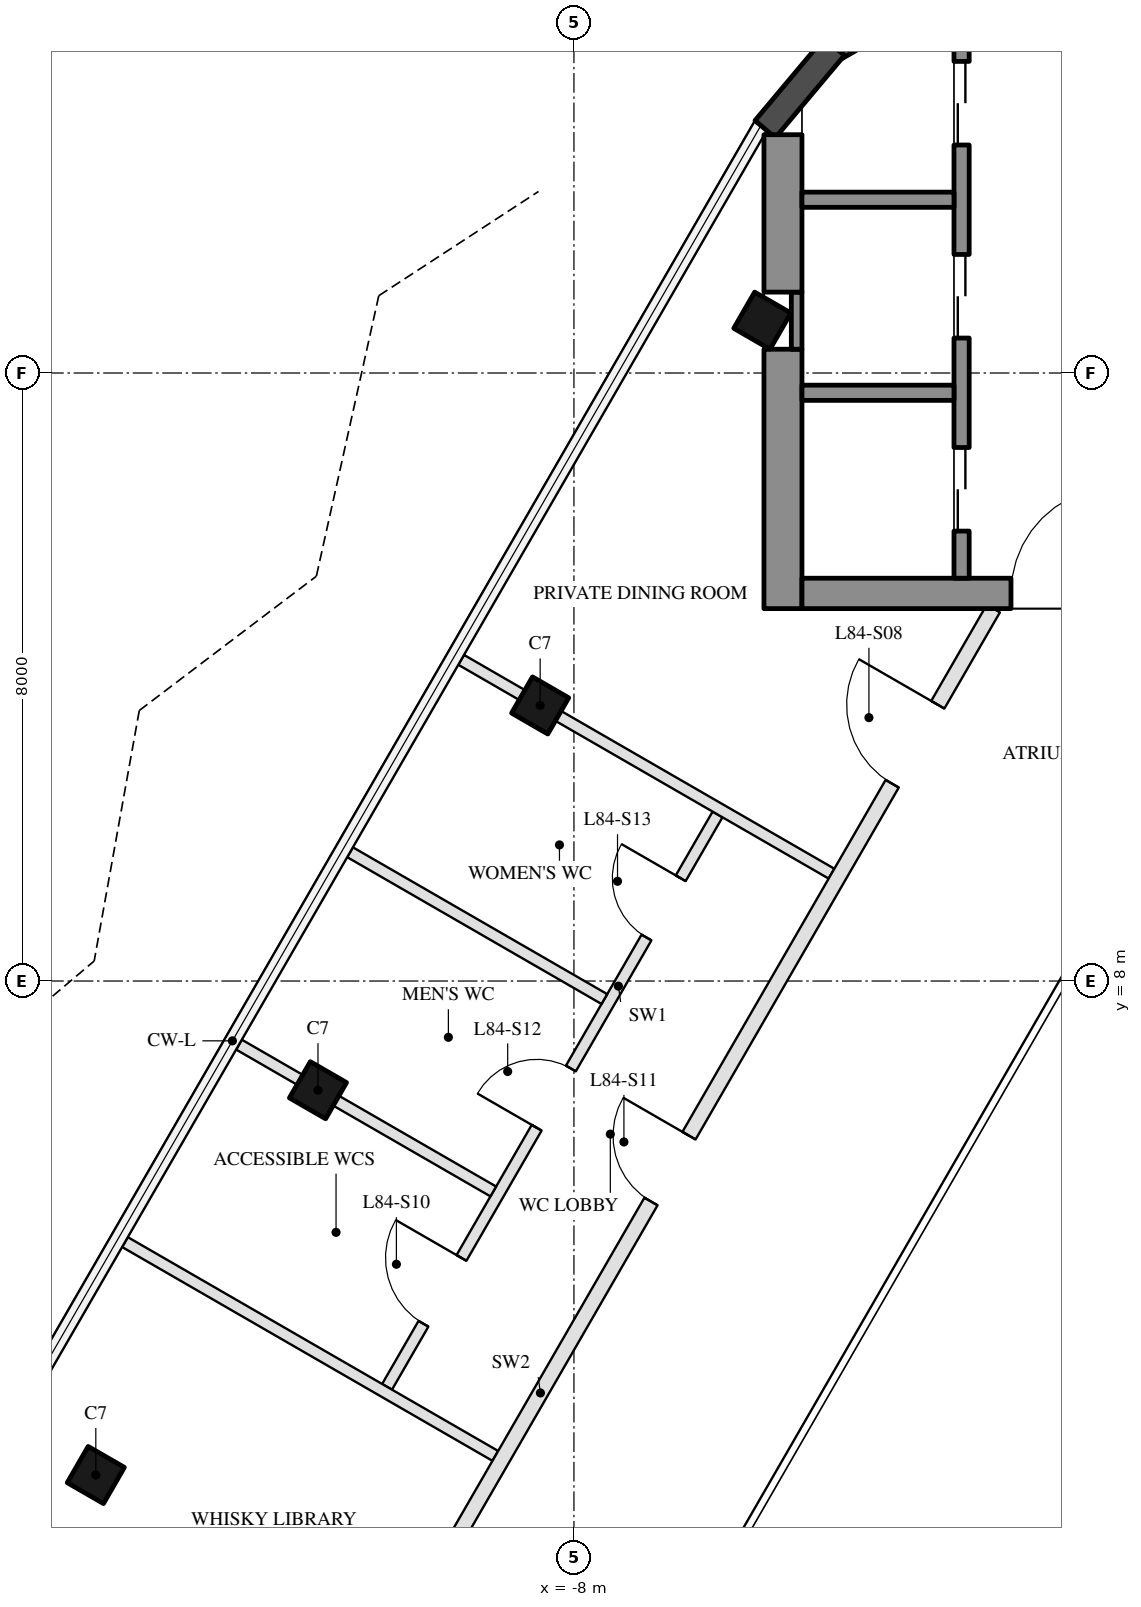
"""IFC4 building model, lengths in metres.
Left out: names, types, materials, properties, quantities, classifications, styles, units other than length and angle.
Written with IfcOpenShell. Run it as: python <this file> out.ifc"""

import sys

from ifc_helpers import new_model, si_unit, direction, frame, frame_2d, origin, origin_2d, place, context, subcontext, project, spatial, rectangle, hollow_rectangle, extrude, boolean, halfspace, element, fill, save


model = new_model("IFC4")
c1 = context("Model", 3, precision=1e-05, world=origin(), true_north=direction((0.0, 1.0)))
c2 = subcontext(c1, "Body", "Model", "MODEL_VIEW")
j1 = project(units=[si_unit("LENGTHUNIT", "METRE"), si_unit("PLANEANGLEUNIT", "RADIAN")], contexts=[c1])
p1 = place(None, origin())
s1 = spatial("IfcSite", under=j1, at=p1, CompositionType="ELEMENT")
p2 = place(p1, origin())
s2 = spatial("IfcBuilding", under=s1, at=p2, CompositionType="ELEMENT")
p3 = place(p2, frame((0.0, 0.0, 338.3)))
s3 = spatial("IfcBuildingStorey", under=s2, at=p3, CompositionType="ELEMENT", Elevation=338.3)
p4 = place(p3, frame((-5.521, 16.689, 0.0), z_axis=(0.0, 0.0, 1.0), x_axis=(0.5, 0.866025403784, 0.0)))
e1 = element("IfcColumn", 1, at=p4, inside=s3, PredefinedType="COLUMN", context=c2, shape_type="SweptSolid", body=[
    boolean("DIFFERENCE", extrude(hollow_rectangle(XDim=0.55, YDim=0.55, WallThickness=0.025, at=origin_2d()), origin(), (0.0, 0.0, 1.0), 5.0), halfspace(frame((0.0, 0.0, 0.024), z_axis=(0.0, 0.0, 1.0), x_axis=(1.0, 0.0, 0.0)), True)),
])
p5 = place(p3, frame((-8.445, 11.626, 0.0), z_axis=(0.0, 0.0, 1.0), x_axis=(0.5, 0.866025403784, 0.0)))
e2 = element("IfcColumn", 2, at=p5, inside=s3, PredefinedType="COLUMN", context=c2, shape_type="SweptSolid", body=[
    boolean("DIFFERENCE", extrude(hollow_rectangle(XDim=0.55, YDim=0.55, WallThickness=0.025, at=origin_2d()), origin(), (0.0, 0.0, 1.0), 5.0), halfspace(frame((0.0, 0.0, 0.02), z_axis=(0.0, 0.0, 1.0), x_axis=(1.0, 0.0, 0.0)), True)),
])
p6 = place(p3, frame((-11.368, 6.563, 0.0), z_axis=(0.0, 0.0, 1.0), x_axis=(0.5, 0.866025403784, 0.0)))
e3 = element("IfcColumn", 3, at=p6, inside=s3, PredefinedType="COLUMN", context=c2, shape_type="SweptSolid", body=[
    boolean("DIFFERENCE", extrude(hollow_rectangle(XDim=0.55, YDim=0.55, WallThickness=0.025, at=origin_2d()), origin(), (0.0, 0.0, 1.0), 5.0), halfspace(frame((0.0, 0.0, 0.019), z_axis=(0.0, 0.0, 1.0), x_axis=(1.0, 0.0, 0.0)), True)),
])
p7 = place(p3, frame((-14.291, 1.5, 0.0), z_axis=(0.0, 0.0, 1.0), x_axis=(0.5, 0.866025403784, 0.0)))
e4 = element("IfcColumn", 4, at=p7, inside=s3, PredefinedType="COLUMN", context=c2, shape_type="SweptSolid", body=[
    boolean("DIFFERENCE", extrude(hollow_rectangle(XDim=0.55, YDim=0.55, WallThickness=0.025, at=origin_2d()), origin(), (0.0, 0.0, 1.0), 5.0), halfspace(frame((0.0, 0.0, 0.02), z_axis=(0.0, 0.0, 1.0), x_axis=(1.0, 0.0, 0.0)), True)),
])
p8 = place(p3, frame((-3.398, 20.959, 0.0), z_axis=(0.0, 0.0, 1.0), x_axis=(-0.866013007135, -0.500021471012, 0.0)))
e5 = element("IfcWall", 5, at=p8, inside=s3, PredefinedType="SOLIDWALL", context=c2, shape_type="SweptSolid", body=[
    extrude(rectangle(XDim=1.414, YDim=0.35, at=frame_2d((0.707, 0.0))), origin(), (0.0, 0.0, 1.0), 4.8),
])
p9 = place(p3, frame((-4.576, 20.292, 0.0), z_axis=(0.0, 0.0, 1.0), x_axis=(-0.642746366971, -0.766079047975, 0.0)))
e6 = element("IfcWall", 6, at=p9, inside=s3, PredefinedType="SOLIDWALL", context=c2, shape_type="SweptSolid", body=[
    extrude(rectangle(XDim=1.413, YDim=0.35, at=frame_2d((0.707, 0.0))), origin(), (0.0, 0.0, 1.0), 4.8),
])
p10 = place(p3, frame((-5.25, 12.9, 0.0), z_axis=(0.0, 0.0, 1.0), x_axis=(0.0, 1.0, 0.0)))
e7 = element("IfcWall", 7, at=p10, inside=s3, PredefinedType="SHEAR", context=c2, shape_type="SweptSolid", body=[
    extrude(rectangle(XDim=3.413, YDim=0.5, at=frame_2d((1.707, 0.0))), origin(), (0.0, 0.0, 1.0), 4.8),
])
p11 = place(p3, frame((-5.07, 16.313, 0.0), z_axis=(0.0, 0.0, 1.0), x_axis=(0.0, 1.0, 0.0)))
e8 = element("IfcWall", 8, at=p11, inside=s3, PredefinedType="SHEAR", context=c2, shape_type="SweptSolid", body=[
    extrude(rectangle(XDim=0.751, YDim=0.14, at=frame_2d((0.376, 0.0))), origin(), (0.0, 0.0, 1.0), 4.8),
])
p12 = place(p3, frame((-5.25, 17.064, 0.0), z_axis=(0.0, 0.0, 1.0), x_axis=(0.0, 1.0, 0.0)))
e9 = element("IfcWall", 9, at=p12, inside=s3, PredefinedType="SHEAR", context=c2, shape_type="SweptSolid", body=[
    extrude(rectangle(XDim=2.071, YDim=0.5, at=frame_2d((1.036, 0.0))), origin(), (0.0, 0.0, 1.0), 4.8),
])
p13 = place(p3, frame((5.0, 13.1, 0.0), z_axis=(0.0, 0.0, 1.0), x_axis=(-1.0, 0.0, 0.0)))
e10 = element("IfcWall", 10, at=p13, inside=s3, PredefinedType="SHEAR", context=c2, shape_type="SweptSolid", body=[
    extrude(rectangle(XDim=10.0, YDim=0.4, at=frame_2d((5.0, 0.0))), origin(), (0.0, 0.0, 1.0), 4.8),
])
p14 = place(p13, frame((3.55, 0.0, 0.0)))
e11 = element("IfcOpeningElement", 11, at=p14, cuts=e10, PredefinedType="OPENING", context=c2, shape_type="SweptSolid", body=[
    extrude(rectangle(XDim=1.1, YDim=2.1, at=frame_2d((0.55, 1.05))), frame((0.0, 0.21, 0.0), z_axis=(0.0, -1.0, 0.0), x_axis=(1.0, 0.0, 0.0)), (0.0, 0.0, 1.0), 0.42),
])
p15 = place(p13, frame((5.85, 0.0, 0.0)))
e12 = element("IfcOpeningElement", 12, at=p15, cuts=e10, PredefinedType="OPENING", context=c2, shape_type="SweptSolid", body=[
    extrude(rectangle(XDim=1.4, YDim=2.1, at=frame_2d((0.7, 1.05))), frame((0.0, 0.21, 0.0), z_axis=(0.0, -1.0, 0.0), x_axis=(1.0, 0.0, 0.0)), (0.0, 0.0, 1.0), 0.42),
])
p16 = place(p3, frame((-2.9, 13.3, 0.0), z_axis=(0.0, 0.0, 1.0), x_axis=(0.0, 1.0, 0.0)))
e13 = element("IfcWall", 13, at=p16, inside=s3, PredefinedType="SHEAR", context=c2, shape_type="SweptSolid", body=[
    extrude(rectangle(XDim=7.576, YDim=0.2, at=frame_2d((3.788, 0.0))), origin(), (0.0, 0.0, 1.0), 4.8),
])
p17 = place(p16, frame((0.62, 0.0, 0.0)))
e14 = element("IfcOpeningElement", 14, at=p17, cuts=e13, PredefinedType="OPENING", context=c2, shape_type="SweptSolid", body=[
    extrude(rectangle(XDim=1.1, YDim=2.1, at=frame_2d((0.55, 1.05))), frame((0.0, 0.11, 0.0), z_axis=(0.0, -1.0, 0.0), x_axis=(1.0, 0.0, 0.0)), (0.0, 0.0, 1.0), 0.22),
])
p18 = place(p16, frame((3.16, 0.0, 0.0)))
e15 = element("IfcOpeningElement", 15, at=p18, cuts=e13, PredefinedType="OPENING", context=c2, shape_type="SweptSolid", body=[
    extrude(rectangle(XDim=1.1, YDim=2.1, at=frame_2d((0.55, 1.05))), frame((0.0, 0.11, 0.0), z_axis=(0.0, -1.0, 0.0), x_axis=(1.0, 0.0, 0.0)), (0.0, 0.0, 1.0), 0.22),
])
p19 = place(p16, frame((5.7, 0.0, 0.0)))
e16 = element("IfcOpeningElement", 16, at=p19, cuts=e13, PredefinedType="OPENING", context=c2, shape_type="SweptSolid", body=[
    extrude(rectangle(XDim=1.1, YDim=2.1, at=frame_2d((0.55, 1.05))), frame((0.0, 0.11, 0.0), z_axis=(0.0, -1.0, 0.0), x_axis=(1.0, 0.0, 0.0)), (0.0, 0.0, 1.0), 0.22),
])
for number, where, z_axis, x_axis in (
    (17, (-3.0, 15.74, 0.0), (0.0, 0.0, 1.0), (-1.0, 0.0, 0.0)),
    (18, (-3.0, 18.28, 0.0), (0.0, 0.0, 1.0), (-1.0, 0.0, 0.0)),
):
    element("IfcWall", number, at=place(p3, frame(where, z_axis=z_axis, x_axis=x_axis)), inside=s3, PredefinedType="SHEAR", context=c2, shape_type="SweptSolid", body=[
        extrude(rectangle(XDim=2.0, YDim=0.2, at=frame_2d((1.0, 0.0))), origin(), (0.0, 0.0, 1.0), 4.8),
    ])
p20 = place(p3, frame((-6.111, 10.192, 0.0), z_axis=(0.0, 0.0, 1.0), x_axis=(-0.500010027813, -0.866019614146, 0.0)))
e19 = element("IfcWall", 19, at=p20, inside=s3, PredefinedType="PARTITIONING", context=c2, shape_type="SweptSolid", body=[
    extrude(rectangle(XDim=8.696, YDim=0.15, at=frame_2d((4.348, 0.0))), origin(), (0.0, 0.0, 1.0), 4.4),
])
p21 = place(p20, frame((6.738, 0.0, 0.0)))
e20 = element("IfcOpeningElement", 20, at=p21, cuts=e19, PredefinedType="OPENING", context=c2, shape_type="SweptSolid", body=[
    extrude(rectangle(XDim=1.0, YDim=2.1, at=frame_2d((0.5, 1.05))), frame((0.0, 0.085, 0.0), z_axis=(0.0, -1.0, 0.0), x_axis=(1.0, 0.0, 0.0)), (0.0, 0.0, 1.0), 0.17),
])
p22 = place(p20, frame((3.86, 0.0, 0.0)))
e21 = element("IfcOpeningElement", 21, at=p22, cuts=e19, PredefinedType="OPENING", context=c2, shape_type="SweptSolid", body=[
    extrude(rectangle(XDim=0.9, YDim=2.1, at=frame_2d((0.45, 1.05))), frame((0.0, 0.085, 0.0), z_axis=(0.0, -1.0, 0.0), x_axis=(1.0, 0.0, 0.0)), (0.0, 0.0, 1.0), 0.17),
])
p23 = place(p20, frame((0.969, 0.0, 0.0)))
e22 = element("IfcOpeningElement", 22, at=p23, cuts=e19, PredefinedType="OPENING", context=c2, shape_type="SweptSolid", body=[
    extrude(rectangle(XDim=0.9, YDim=2.1, at=frame_2d((0.45, 1.05))), frame((0.0, 0.085, 0.0), z_axis=(0.0, -1.0, 0.0), x_axis=(1.0, 0.0, 0.0)), (0.0, 0.0, 1.0), 0.17),
])
p24 = place(p3, frame((-9.484, 12.226, 0.0), z_axis=(0.0, 0.0, 1.0), x_axis=(0.866039621134, -0.49997537402, 0.0)))
e23 = element("IfcWall", 23, at=p24, inside=s3, PredefinedType="PARTITIONING", context=c2, shape_type="SweptSolid", body=[
    extrude(rectangle(XDim=5.626, YDim=0.15, at=frame_2d((2.813, 0.0))), origin(), (0.0, 0.0, 1.0), 4.4),
])
for number, where, z_axis, x_axis in (
    (24, (-10.945, 9.695, 0.0), (0.0, 0.0, 1.0), (0.866, -0.5, 0.0)),
    (25, (-12.407, 7.163, 0.0), (0.0, 0.0, 1.0), (0.866, -0.5, 0.0)),
):
    element("IfcWall", number, at=place(p3, frame(where, z_axis=z_axis, x_axis=x_axis)), inside=s3, PredefinedType="PARTITIONING", context=c2, shape_type="SweptSolid", body=[
        extrude(rectangle(XDim=3.864, YDim=0.15, at=frame_2d((1.932, 0.0))), origin(), (0.0, 0.0, 1.0), 4.4),
    ])
p25 = place(p3, frame((-13.907, 4.565, 0.0), z_axis=(0.0, 0.0, 1.0), x_axis=(0.866039621134, -0.49997537402, 0.0)))
e26 = element("IfcWall", 26, at=p25, inside=s3, PredefinedType="PARTITIONING", context=c2, shape_type="SweptSolid", body=[
    extrude(rectangle(XDim=5.626, YDim=0.15, at=frame_2d((2.813, 0.0))), origin(), (0.0, 0.0, 1.0), 4.4),
])
p26 = place(p3, frame((-2.482, 12.9, 0.0), z_axis=(0.0, 0.0, 1.0), x_axis=(-0.50000478328, -0.866022642139, 0.0)))
e27 = element("IfcWall", 27, at=p26, inside=s3, PredefinedType="PARTITIONING", context=c2, shape_type="SweptSolid", body=[
    extrude(rectangle(XDim=19.861, YDim=0.2, at=frame_2d((9.931, 0.0))), origin(), (0.0, 0.0, 1.0), 4.4),
])
p27 = place(p26, frame((1.461, 0.0, 0.0)))
e28 = element("IfcOpeningElement", 28, at=p27, cuts=e27, PredefinedType="OPENING", context=c2, shape_type="SweptSolid", body=[
    extrude(rectangle(XDim=1.2, YDim=2.1, at=frame_2d((0.6, 1.05))), frame((0.0, 0.11, 0.0), z_axis=(0.0, -1.0, 0.0), x_axis=(1.0, 0.0, 0.0)), (0.0, 0.0, 1.0), 0.22),
])
p28 = place(p26, frame((15.778, 0.0, 0.0)))
e29 = element("IfcOpeningElement", 29, at=p28, cuts=e27, PredefinedType="OPENING", context=c2, shape_type="SweptSolid", body=[
    extrude(rectangle(XDim=1.2, YDim=2.1, at=frame_2d((0.6, 1.05))), frame((0.0, 0.11, 0.0), z_axis=(0.0, -1.0, 0.0), x_axis=(1.0, 0.0, 0.0)), (0.0, 0.0, 1.0), 0.22),
])
p29 = place(p26, frame((8.008, 0.0, 0.0)))
e30 = element("IfcOpeningElement", 30, at=p29, cuts=e27, PredefinedType="OPENING", context=c2, shape_type="SweptSolid", body=[
    extrude(rectangle(XDim=1.0, YDim=2.1, at=frame_2d((0.5, 1.05))), frame((0.0, 0.11, 0.0), z_axis=(0.0, -1.0, 0.0), x_axis=(1.0, 0.0, 0.0)), (0.0, 0.0, 1.0), 0.22),
])
p30 = place(p17, origin())
e31 = element("IfcDoor", 31, at=p30, inside=s3, OperationType="DOUBLE_DOOR_SLIDING", PredefinedType="DOOR", context=c2, shape_type="SweptSolid", body=[
    extrude(rectangle(XDim=1.1, YDim=2.1, at=frame_2d((0.55, 1.05))), frame((0.0, 0.025, 0.0), z_axis=(0.0, -1.0, 0.0), x_axis=(1.0, 0.0, 0.0)), (0.0, 0.0, 1.0), 0.05),
])
fill(e14, e31)
p31 = place(p18, origin())
e32 = element("IfcDoor", 32, at=p31, inside=s3, OperationType="DOUBLE_DOOR_SLIDING", PredefinedType="DOOR", context=c2, shape_type="SweptSolid", body=[
    extrude(rectangle(XDim=1.1, YDim=2.1, at=frame_2d((0.55, 1.05))), frame((0.0, 0.025, 0.0), z_axis=(0.0, -1.0, 0.0), x_axis=(1.0, 0.0, 0.0)), (0.0, 0.0, 1.0), 0.05),
])
fill(e15, e32)
p32 = place(p19, origin())
e33 = element("IfcDoor", 33, at=p32, inside=s3, OperationType="DOUBLE_DOOR_SLIDING", PredefinedType="DOOR", context=c2, shape_type="SweptSolid", body=[
    extrude(rectangle(XDim=1.1, YDim=2.1, at=frame_2d((0.55, 1.05))), frame((0.0, 0.025, 0.0), z_axis=(0.0, -1.0, 0.0), x_axis=(1.0, 0.0, 0.0)), (0.0, 0.0, 1.0), 0.05),
])
fill(e16, e33)
p33 = place(p15, frame((1.4, 0.0, 0.0), z_axis=(0.0, 0.0, 1.0), x_axis=(-1.0, 0.0, 0.0)))
e34 = element("IfcDoor", 34, at=p33, inside=s3, OperationType="DOUBLE_DOOR_SINGLE_SWING", PredefinedType="DOOR", context=c2, shape_type="SweptSolid", body=[
    extrude(rectangle(XDim=1.4, YDim=2.1, at=frame_2d((0.7, 1.05))), frame((0.0, 0.025, 0.0), z_axis=(0.0, -1.0, 0.0), x_axis=(1.0, 0.0, 0.0)), (0.0, 0.0, 1.0), 0.05),
])
fill(e12, e34)
p34 = place(p27, frame((1.2, 0.0, 0.0), z_axis=(0.0, 0.0, 1.0), x_axis=(-1.0, 0.0, 0.0)))
e35 = element("IfcDoor", 35, at=p34, inside=s3, OperationType="SINGLE_SWING_RIGHT", PredefinedType="DOOR", context=c2, shape_type="SweptSolid", body=[
    extrude(rectangle(XDim=1.2, YDim=2.1, at=frame_2d((0.6, 1.05))), frame((0.0, 0.025, 0.0), z_axis=(0.0, -1.0, 0.0), x_axis=(1.0, 0.0, 0.0)), (0.0, 0.0, 1.0), 0.05),
])
fill(e28, e35)
p35 = place(p21, frame((1.0, 0.0, 0.0), z_axis=(0.0, 0.0, 1.0), x_axis=(-1.0, 0.0, 0.0)))
e36 = element("IfcDoor", 36, at=p35, inside=s3, OperationType="SINGLE_SWING_RIGHT", PredefinedType="DOOR", context=c2, shape_type="SweptSolid", body=[
    extrude(rectangle(XDim=1.0, YDim=2.1, at=frame_2d((0.5, 1.05))), frame((0.0, 0.025, 0.0), z_axis=(0.0, -1.0, 0.0), x_axis=(1.0, 0.0, 0.0)), (0.0, 0.0, 1.0), 0.05),
])
fill(e20, e36)
p36 = place(p29, frame((1.0, 0.0, 0.0), z_axis=(0.0, 0.0, 1.0), x_axis=(-1.0, 0.0, 0.0)))
e37 = element("IfcDoor", 37, at=p36, inside=s3, OperationType="SINGLE_SWING_RIGHT", PredefinedType="DOOR", context=c2, shape_type="SweptSolid", body=[
    extrude(rectangle(XDim=1.0, YDim=2.1, at=frame_2d((0.5, 1.05))), frame((0.0, 0.025, 0.0), z_axis=(0.0, -1.0, 0.0), x_axis=(1.0, 0.0, 0.0)), (0.0, 0.0, 1.0), 0.05),
])
fill(e30, e37)
p37 = place(p22, frame((0.9, 0.0, 0.0), z_axis=(0.0, 0.0, 1.0), x_axis=(-1.0, 0.0, 0.0)))
e38 = element("IfcDoor", 38, at=p37, inside=s3, OperationType="SINGLE_SWING_LEFT", PredefinedType="DOOR", context=c2, shape_type="SweptSolid", body=[
    extrude(rectangle(XDim=0.9, YDim=2.1, at=frame_2d((0.45, 1.05))), frame((0.0, 0.025, 0.0), z_axis=(0.0, -1.0, 0.0), x_axis=(1.0, 0.0, 0.0)), (0.0, 0.0, 1.0), 0.05),
])
fill(e21, e38)
p38 = place(p23, frame((0.9, 0.0, 0.0), z_axis=(0.0, 0.0, 1.0), x_axis=(-1.0, 0.0, 0.0)))
e39 = element("IfcDoor", 39, at=p38, inside=s3, OperationType="SINGLE_SWING_RIGHT", PredefinedType="DOOR", context=c2, shape_type="SweptSolid", body=[
    extrude(rectangle(XDim=0.9, YDim=2.1, at=frame_2d((0.45, 1.05))), frame((0.0, 0.025, 0.0), z_axis=(0.0, -1.0, 0.0), x_axis=(1.0, 0.0, 0.0)), (0.0, 0.0, 1.0), 0.05),
])
fill(e22, e39)
save(model, sys.argv[1])
